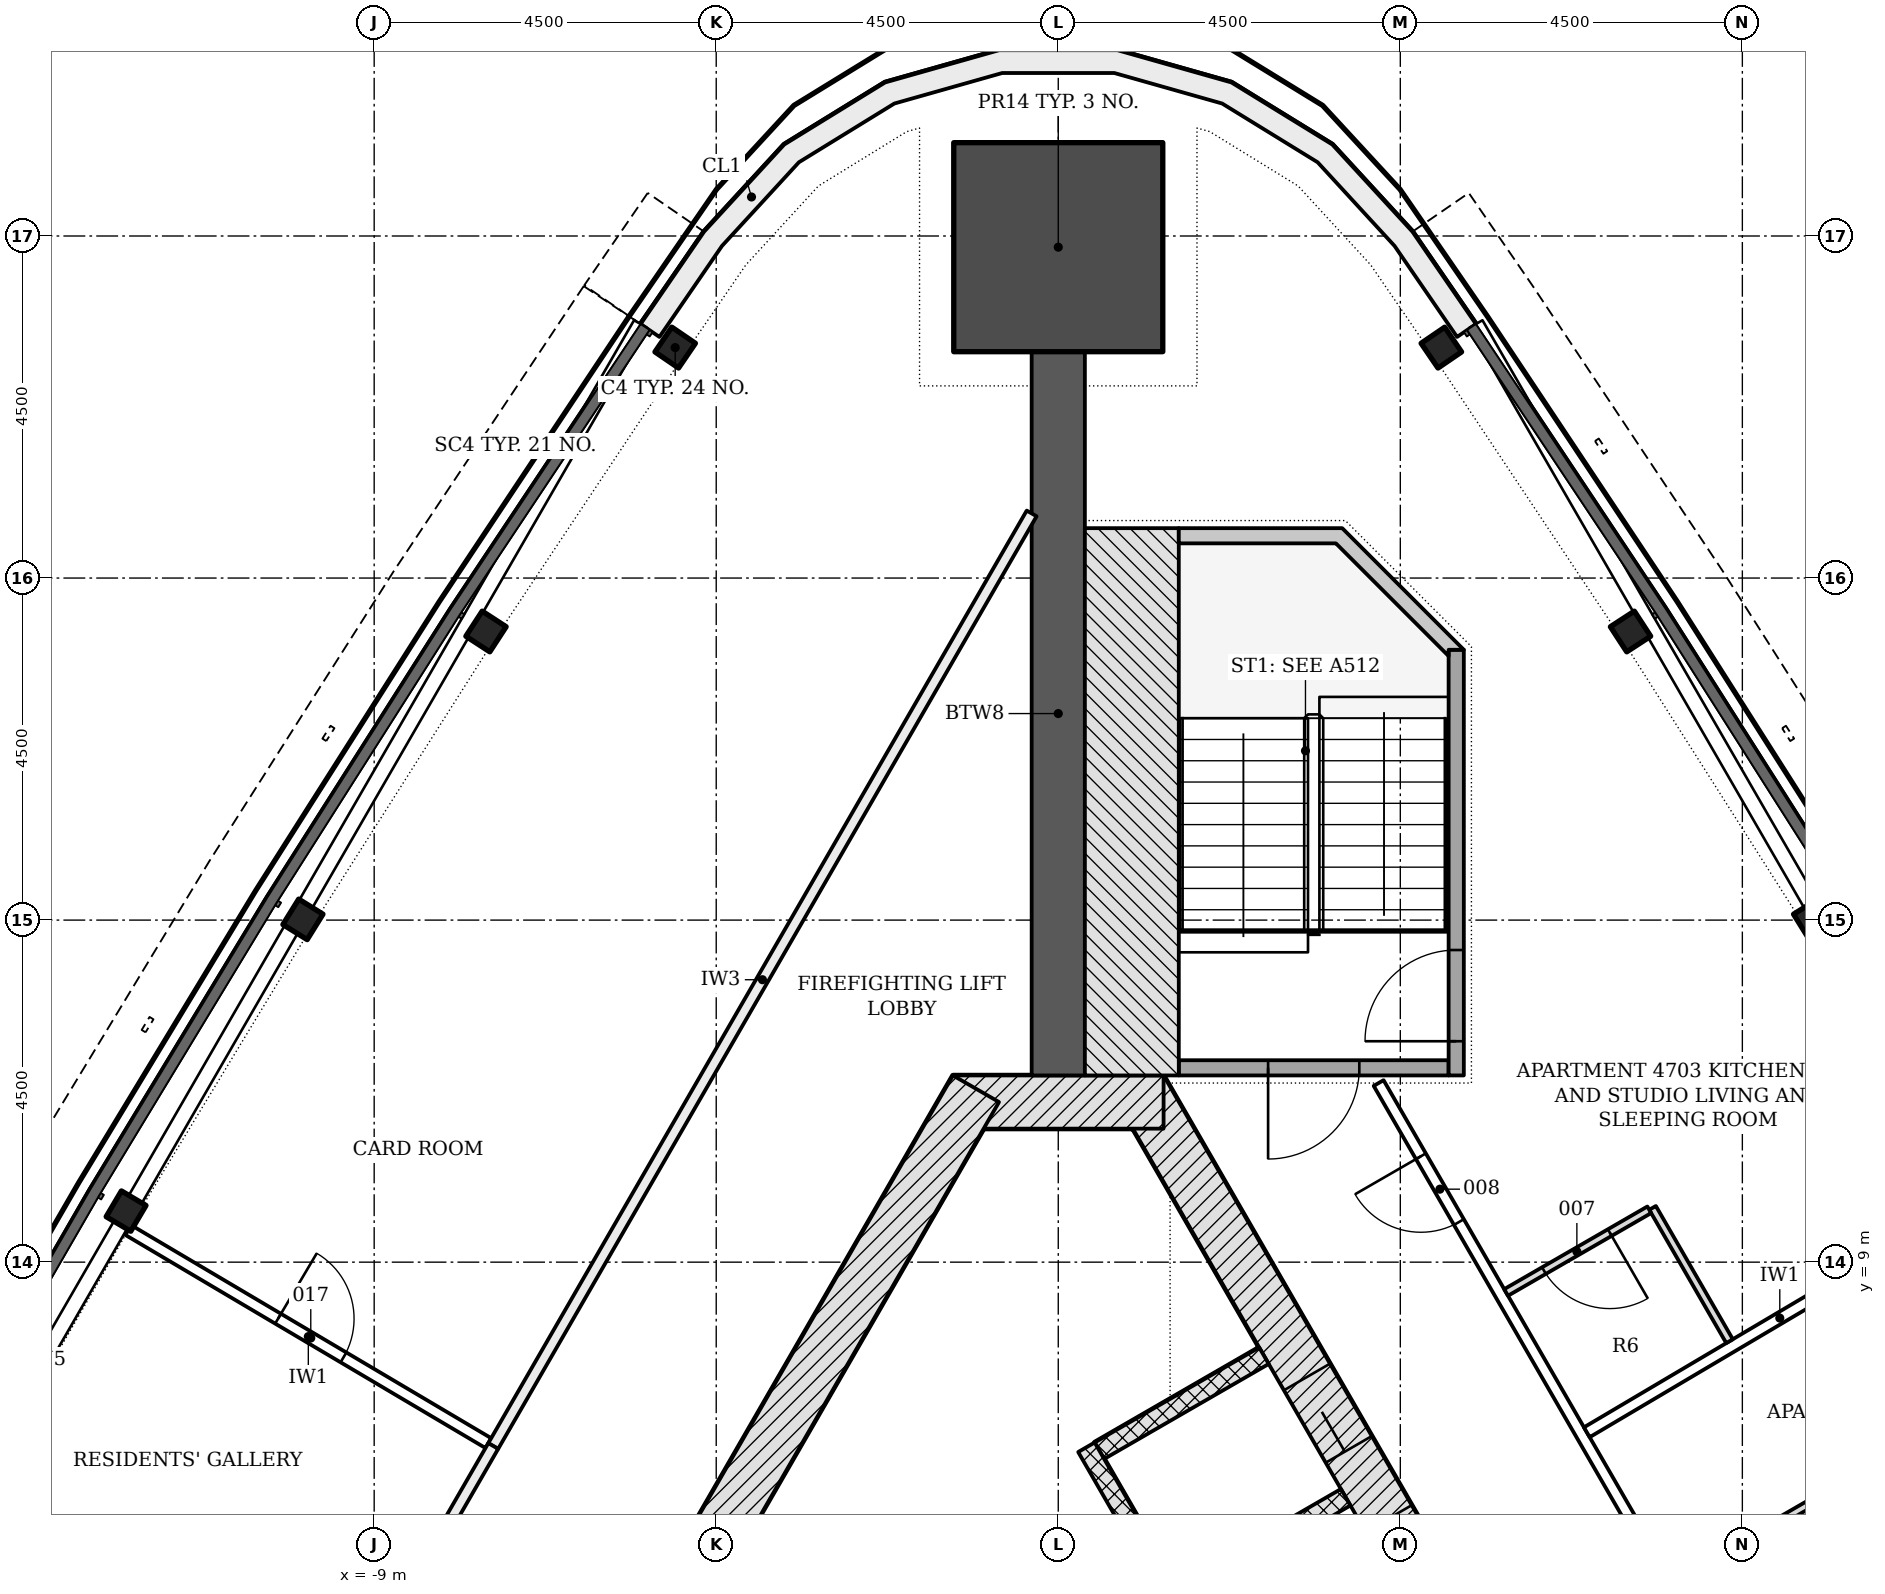
"""IFC4 building model, lengths in metres.
Left out: names, types, materials, properties, quantities, classifications, styles, units other than length and angle.
Written with IfcOpenShell. Run it as: python <this file> out.ifc"""

import sys

from ifc_helpers import new_model, si_unit, direction, frame, frame_2d, origin, origin_2d, place, context, subcontext, project, spatial, polyline, rectangle, i_section, outline, extrude, element, fill, save


model = new_model("IFC4")
c1 = context("Model", 3, precision=1e-05, world=origin(), true_north=direction((0.0, 1.0)))
c2 = subcontext(c1, "Body", "Model", "MODEL_VIEW")
j1 = project(units=[si_unit("LENGTHUNIT", "METRE"), si_unit("PLANEANGLEUNIT", "RADIAN")], contexts=[c1])
p1 = place(None, origin())
s1 = spatial("IfcSite", under=j1, at=p1, CompositionType="ELEMENT")
p2 = place(p1, origin())
s2 = spatial("IfcBuilding", under=s1, at=p2, CompositionType="ELEMENT")
p3 = place(p2, frame((0.0, 0.0, 185.1)))
s3 = spatial("IfcBuildingStorey", under=s2, at=p3, CompositionType="ELEMENT", Elevation=185.1)
p4 = place(p3, frame((10.311, -4.703, -0.2), z_axis=(0.0, 0.0, 1.0), x_axis=(-0.500001446645, 0.866024568562, 0.0)))
e1 = element("IfcWall", 1, at=p4, inside=s3, PredefinedType="SHEAR", context=c2, shape_type="SweptSolid", body=[
    extrude(rectangle(XDim=18.458, YDim=0.7, at=frame_2d((9.229, 0.0))), origin(), (0.0, 0.0, 1.0), 3.6),
])
p5 = place(p4, frame((4.379, 0.0, 0.2)))
e2 = element("IfcOpeningElement", 2, at=p5, cuts=e1, PredefinedType="OPENING", context=c2, shape_type="SweptSolid", body=[
    extrude(rectangle(XDim=1.1, YDim=2.1, at=frame_2d((0.55, 1.05))), frame((0.0, 0.36, 0.0), z_axis=(0.0, -1.0, 0.0), x_axis=(1.0, 0.0, 0.0)), (0.0, 0.0, 1.0), 0.72),
])
p6 = place(p4, frame((6.529, 0.0, 0.2)))
e3 = element("IfcOpeningElement", 3, at=p6, cuts=e1, PredefinedType="OPENING", context=c2, shape_type="SweptSolid", body=[
    extrude(rectangle(XDim=1.1, YDim=2.1, at=frame_2d((0.55, 1.05))), frame((0.0, 0.36, 0.0), z_axis=(0.0, -1.0, 0.0), x_axis=(1.0, 0.0, 0.0)), (0.0, 0.0, 1.0), 0.72),
])
p7 = place(p4, frame((8.679, 0.0, 0.2)))
e4 = element("IfcOpeningElement", 4, at=p7, cuts=e1, PredefinedType="OPENING", context=c2, shape_type="SweptSolid", body=[
    extrude(rectangle(XDim=1.1, YDim=2.1, at=frame_2d((0.55, 1.05))), frame((0.0, 0.36, 0.0), z_axis=(0.0, -1.0, 0.0), x_axis=(1.0, 0.0, 0.0)), (0.0, 0.0, 1.0), 0.72),
])
p8 = place(p4, frame((10.829, 0.0, 0.2)))
e5 = element("IfcOpeningElement", 5, at=p8, cuts=e1, PredefinedType="OPENING", context=c2, shape_type="SweptSolid", body=[
    extrude(rectangle(XDim=1.1, YDim=2.1, at=frame_2d((0.55, 1.05))), frame((0.0, 0.36, 0.0), z_axis=(0.0, -1.0, 0.0), x_axis=(1.0, 0.0, 0.0)), (0.0, 0.0, 1.0), 0.72),
])
p9 = place(p4, frame((12.979, 0.0, 0.2)))
e6 = element("IfcOpeningElement", 6, at=p9, cuts=e1, PredefinedType="OPENING", context=c2, shape_type="SweptSolid", body=[
    extrude(rectangle(XDim=1.1, YDim=2.1, at=frame_2d((0.55, 1.05))), frame((0.0, 0.36, 0.0), z_axis=(0.0, -1.0, 0.0), x_axis=(1.0, 0.0, 0.0)), (0.0, 0.0, 1.0), 0.72),
])
p10 = place(p3, frame((1.386, 11.106, -0.2), z_axis=(0.0, 0.0, 1.0), x_axis=(-1.0, 0.0, 0.0)))
e7 = element("IfcWall", 7, at=p10, inside=s3, PredefinedType="SHEAR", context=c2, shape_type="SweptSolid", body=[
    extrude(rectangle(XDim=2.771, YDim=0.7, at=frame_2d((1.386, 0.0))), origin(), (0.0, 0.0, 1.0), 3.6),
])
p11 = place(p3, frame((-1.083, 11.281, -0.2), z_axis=(0.0, 0.0, 1.0), x_axis=(-0.500001446645, -0.866024568562, 0.0)))
e8 = element("IfcWall", 8, at=p11, inside=s3, PredefinedType="SHEAR", context=c2, shape_type="SweptSolid", body=[
    extrude(rectangle(XDim=18.458, YDim=0.7, at=frame_2d((9.229, 0.0))), origin(), (0.0, 0.0, 1.0), 3.6),
])
p12 = place(p11, frame((8.979, 0.0, 0.2)))
e9 = element("IfcOpeningElement", 9, at=p12, cuts=e8, PredefinedType="OPENING", context=c2, shape_type="SweptSolid", body=[
    extrude(rectangle(XDim=1.2, YDim=2.1, at=frame_2d((0.6, 1.05))), frame((0.0, 0.36, 0.0), z_axis=(0.0, -1.0, 0.0), x_axis=(1.0, 0.0, 0.0)), (0.0, 0.0, 1.0), 0.72),
])
p13 = place(p11, frame((11.029, 0.0, 0.2)))
e10 = element("IfcOpeningElement", 10, at=p13, cuts=e8, PredefinedType="OPENING", context=c2, shape_type="SweptSolid", body=[
    extrude(rectangle(XDim=1.2, YDim=2.1, at=frame_2d((0.6, 1.05))), frame((0.0, 0.36, 0.0), z_axis=(0.0, -1.0, 0.0), x_axis=(1.0, 0.0, 0.0)), (0.0, 0.0, 1.0), 0.72),
])
p14 = place(p3, frame((0.0, 11.456, -0.2), z_axis=(0.0, 0.0, 1.0), x_axis=(0.0, 1.0, 0.0)))
e11 = element("IfcWall", 11, at=p14, inside=s3, PredefinedType="SHEAR", context=c2, shape_type="SweptSolid", body=[
    extrude(rectangle(XDim=9.522, YDim=0.7, at=frame_2d((4.761, 0.0))), origin(), (0.0, 0.0, 1.0), 3.6),
])
p15 = place(p3, frame((0.0, 22.353, -0.2), z_axis=(0.0, 0.0, 1.0), x_axis=(0.0, 1.0, 0.0)))
e12 = element("IfcColumn", 12, at=p15, inside=s3, PredefinedType="COLUMN", context=c2, shape_type="SweptSolid", body=[
    extrude(rectangle(XDim=2.75, YDim=2.75, at=origin_2d()), origin(), (0.0, 0.0, 1.0), 3.6),
])
for number, where, z_axis, x_axis in (
    (13, (-5.04, 21.032, -0.2), (0.0, 0.0, 1.0), (-0.563, -0.826, 0.0)),
    (14, (-7.529, 17.297, -0.2), (0.0, 0.0, 1.0), (-0.546, -0.838, 0.0)),
    (15, (-9.937, 13.51, -0.2), (0.0, 0.0, 1.0), (-0.528, -0.85, 0.0)),
    (16, (-12.264, 9.672, -0.2), (0.0, 0.0, 1.0), (-0.509, -0.861, 0.0)),
    (17, (9.937, 13.51, -0.2), (0.0, 0.0, 1.0), (-0.528, 0.85, 0.0)),
    (18, (7.529, 17.297, -0.2), (0.0, 0.0, 1.0), (-0.546, 0.838, 0.0)),
    (19, (5.04, 21.032, -0.2), (0.0, 0.0, 1.0), (-0.563, 0.826, 0.0)),
):
    element("IfcColumn", number, at=place(p3, frame(where, z_axis=z_axis, x_axis=x_axis)), inside=s3, PredefinedType="COLUMN", context=c2, shape_type="SweptSolid", body=[
        extrude(i_section(OverallWidth=0.394, OverallDepth=0.376, WebThickness=0.017, FlangeThickness=0.028, FilletRadius=0.015, at=origin_2d()), origin(), (0.0, 0.0, 1.0), 3.6),
    ])
p16 = place(p3, origin())
e20 = element("IfcWall", 20, at=p16, inside=s3, PredefinedType="NOTDEFINED", context=c2, shape_type="SweptSolid", body=[
    extrude(outline(polyline([(5.494, 21.342), (4.659, 22.557), (3.605, 23.704), (2.278, 24.52), (0.779, 24.944), (-0.779, 24.944), (-2.278, 24.52), (-3.605, 23.704), (-4.659, 22.557), (-5.494, 21.342), (-5.247, 21.172), (-4.424, 22.369), (-3.412, 23.47), (-2.156, 24.243), (-0.737, 24.644), (0.737, 24.644), (2.156, 24.243), (3.412, 23.47), (4.424, 22.369), (5.247, 21.172), (5.494, 21.342)])), origin(), (0.0, 0.0, 1.0), 3.3),
])
for number, where, z_axis, x_axis in (
    (21, (3.781, 5.907, -0.2), (0.0, 0.0, 1.0), (-0.866, -0.5, 0.0)),
    (22, (2.706, 7.769, -0.2), (0.0, 0.0, 1.0), (-0.866, -0.5, 0.0)),
):
    element("IfcWall", number, at=place(p3, frame(where, z_axis=z_axis, x_axis=x_axis)), inside=s3, PredefinedType="PARTITIONING", context=c2, shape_type="SweptSolid", body=[
        extrude(rectangle(XDim=2.5, YDim=0.25, at=frame_2d((1.25, 0.0))), origin(), (0.0, 0.0, 1.0), 3.6),
    ])
p17 = place(p3, frame((5.87, -2.961, 0.0), z_axis=(0.0, 0.0, 1.0), x_axis=(-0.50000615651, 0.866021849293, 0.0)))
e23 = element("IfcWall", 23, at=p17, inside=s3, PredefinedType="PARTITIONING", context=c2, shape_type="SweptSolid", body=[
    extrude(rectangle(XDim=11.0, YDim=0.25, at=frame_2d((5.5, 0.0))), origin(), (0.0, 0.0, 1.0), 3.4),
])
p18 = place(p3, frame((5.135, 11.556, -0.2), z_axis=(0.0, 0.0, 1.0), x_axis=(-1.0, 0.0, 0.0)))
e24 = element("IfcWall", 24, at=p18, inside=s3, PredefinedType="SHEAR", context=c2, shape_type="SweptSolid", body=[
    extrude(rectangle(XDim=3.55, YDim=0.2, at=frame_2d((1.775, 0.0))), origin(), (0.0, 0.0, 1.0), 3.6),
])
p19 = place(p18, frame((1.175, 0.0, 0.2)))
e25 = element("IfcOpeningElement", 25, at=p19, cuts=e24, PredefinedType="OPENING", context=c2, shape_type="SweptSolid", body=[
    extrude(rectangle(XDim=1.2, YDim=2.1, at=frame_2d((0.6, 1.05))), frame((0.0, 0.11, 0.0), z_axis=(0.0, -1.0, 0.0), x_axis=(1.0, 0.0, 0.0)), (0.0, 0.0, 1.0), 0.22),
])
p20 = place(p3, frame((5.236, 11.456, -0.2), z_axis=(0.0, 0.0, 1.0), x_axis=(0.0, 1.0, 0.0)))
e26 = element("IfcWall", 26, at=p20, inside=s3, PredefinedType="SHEAR", context=c2, shape_type="SweptSolid", body=[
    extrude(rectangle(XDim=5.6, YDim=0.2, at=frame_2d((2.8, 0.0))), origin(), (0.0, 0.0, 1.0), 3.6),
])
p21 = place(p20, frame((0.45, 0.0, 0.2)))
e27 = element("IfcOpeningElement", 27, at=p21, cuts=e26, PredefinedType="OPENING", context=c2, shape_type="SweptSolid", body=[
    extrude(rectangle(XDim=1.2, YDim=2.1, at=frame_2d((0.6, 1.05))), frame((0.0, 0.11, 0.0), z_axis=(0.0, -1.0, 0.0), x_axis=(1.0, 0.0, 0.0)), (0.0, 0.0, 1.0), 0.22),
])
p22 = place(p3, frame((0.968, 11.456, -0.2), z_axis=(0.0, 0.0, 1.0), x_axis=(0.0, 1.0, 0.0)))
e28 = element("IfcWall", 28, at=p22, inside=s3, PredefinedType="SHEAR", context=c2, shape_type="SweptSolid", body=[
    extrude(rectangle(XDim=7.2, YDim=1.236, at=frame_2d((3.6, 0.0))), origin(), (0.0, 0.0, 1.0), 3.6),
])
p23 = place(p3, frame((0.0, 0.0, -0.2)))
e29 = element("IfcWall", 29, at=p23, inside=s3, PredefinedType="SHEAR", context=c2, shape_type="SweptSolid", body=[
    extrude(outline(polyline([(5.336, 17.056), (3.736, 18.656), (1.586, 18.656), (1.586, 18.456), (3.653, 18.456), (5.135, 16.974), (5.135, 17.056), (5.135, 17.056), (5.135, 17.056), (5.135, 17.056), (5.135, 17.056), (5.135, 17.056), (5.135, 17.056), (5.135, 17.056), (5.135, 17.056), (5.135, 17.056), (5.135, 17.056), (5.135, 17.056), (5.135, 17.056), (5.135, 17.056), (5.135, 17.056), (5.135, 17.056), (5.135, 17.056), (5.336, 17.056)])), origin(), (0.0, 0.0, 1.0), 3.6),
])
p24 = place(p3, frame((11.247, -0.824, 0.0), z_axis=(0.0, 0.0, 1.0), x_axis=(-0.499997921847, 0.866026603603, 0.0)))
e30 = element("IfcWall", 30, at=p24, inside=s3, PredefinedType="PARTITIONING", context=c2, shape_type="SweptSolid", body=[
    extrude(rectangle(XDim=14.065, YDim=0.15, at=frame_2d((7.032, 0.0))), origin(), (0.0, 0.0, 1.0), 2.847),
])
p25 = place(p24, frame((11.953, 0.0, 0.0)))
e31 = element("IfcOpeningElement", 31, at=p25, cuts=e30, PredefinedType="OPENING", context=c2, shape_type="SweptSolid", body=[
    extrude(rectangle(XDim=1.0, YDim=2.1, at=frame_2d((0.5, 1.05))), frame((0.0, 0.085, 0.0), z_axis=(0.0, -1.0, 0.0), x_axis=(1.0, 0.0, 0.0)), (0.0, 0.0, 1.0), 0.17),
])
p26 = place(p3, frame((14.277, 5.885, 0.0), z_axis=(0.0, 0.0, 1.0), x_axis=(-0.871335785584, -0.490687220907, 0.0)))
e32 = element("IfcWall", 32, at=p26, inside=s3, PredefinedType="PARTITIONING", context=c2, shape_type="SweptSolid", body=[
    extrude(rectangle(XDim=5.904, YDim=0.1, at=frame_2d((2.952, 0.0))), origin(), (0.0, 0.0, 1.0), 3.4),
])
p27 = place(p26, frame((1.339, 0.0, 0.0)))
e33 = element("IfcOpeningElement", 33, at=p27, cuts=e32, PredefinedType="OPENING", context=c2, shape_type="SweptSolid", body=[
    extrude(rectangle(XDim=1.0, YDim=2.1, at=frame_2d((0.5, 1.05))), frame((0.0, 0.06, 0.0), z_axis=(0.0, -1.0, 0.0), x_axis=(1.0, 0.0, 0.0)), (0.0, 0.0, 1.0), 0.12),
])
p28 = place(p26, frame((4.329, 0.0, 0.0)))
e34 = element("IfcOpeningElement", 34, at=p28, cuts=e32, PredefinedType="OPENING", context=c2, shape_type="SweptSolid", body=[
    extrude(rectangle(XDim=1.0, YDim=2.1, at=frame_2d((0.5, 1.05))), frame((0.0, 0.06, 0.0), z_axis=(0.0, -1.0, 0.0), x_axis=(1.0, 0.0, 0.0)), (0.0, 0.0, 1.0), 0.12),
])
p29 = place(p3, frame((9.979, 5.873, 0.0), z_axis=(0.0, 0.0, 1.0), x_axis=(-0.866037911478, -0.499978335414, 0.0)))
e35 = element("IfcWall", 35, at=p29, inside=s3, PredefinedType="PARTITIONING", context=c2, shape_type="SweptSolid", body=[
    extrude(rectangle(XDim=2.175, YDim=0.1, at=frame_2d((1.087, 0.0))), origin(), (0.0, 0.0, 1.0), 3.4),
])
p30 = place(p3, frame((12.031, 9.766, 0.0), z_axis=(0.0, 0.0, 1.0), x_axis=(-0.860638865546, -0.509215811922, 0.0)))
e36 = element("IfcWall", 36, at=p30, inside=s3, PredefinedType="PARTITIONING", context=c2, shape_type="SweptSolid", body=[
    extrude(rectangle(XDim=5.9, YDim=0.15, at=frame_2d((2.95, 0.0))), origin(), (0.0, 0.0, 1.0), 3.4),
])
p31 = place(p3, frame((8.831, 7.96, 0.0), z_axis=(0.0, 0.0, 1.0), x_axis=(-0.499990325971, 0.866030989016, 0.0)))
e37 = element("IfcWall", 37, at=p31, inside=s3, PredefinedType="PARTITIONING", context=c2, shape_type="SweptSolid", body=[
    extrude(rectangle(XDim=2.025, YDim=0.1, at=frame_2d((1.012, 0.0))), origin(), (0.0, 0.0, 1.0), 3.4),
])
p32 = place(p3, frame((7.775, 9.689, 0.0), z_axis=(0.0, 0.0, 1.0), x_axis=(-0.865989304205, -0.500062521093, 0.0)))
e38 = element("IfcWall", 38, at=p32, inside=s3, PredefinedType="PARTITIONING", context=c2, shape_type="SweptSolid", body=[
    extrude(rectangle(XDim=2.175, YDim=0.1, at=frame_2d((1.087, 0.0))), origin(), (0.0, 0.0, 1.0), 3.4),
])
p33 = place(p32, frame((0.6, 0.0, 0.0)))
e39 = element("IfcOpeningElement", 39, at=p33, cuts=e38, PredefinedType="OPENING", context=c2, shape_type="SweptSolid", body=[
    extrude(rectangle(XDim=1.0, YDim=2.1, at=frame_2d((0.5, 1.05))), frame((0.0, 0.06, 0.0), z_axis=(0.0, -1.0, 0.0), x_axis=(1.0, 0.0, 0.0)), (0.0, 0.0, 1.0), 0.12),
])
p34 = place(p3, frame((-0.35, 18.85, 0.0), z_axis=(0.0, 0.0, 1.0), x_axis=(-0.500005388685, -0.866022292603, 0.0)))
e40 = element("IfcWall", 40, at=p34, inside=s3, PredefinedType="PARTITIONING", context=c2, shape_type="SweptSolid", body=[
    extrude(rectangle(XDim=14.167, YDim=0.15, at=frame_2d((7.083, 0.0))), origin(), (0.0, 0.0, 1.0), 2.847),
])
p35 = place(p3, frame((-12.235, 9.422, 0.0), z_axis=(0.0, 0.0, 1.0), x_axis=(0.860631434237, -0.509228371562, 0.0)))
e41 = element("IfcWall", 41, at=p35, inside=s3, PredefinedType="PARTITIONING", context=c2, shape_type="SweptSolid", body=[
    extrude(rectangle(XDim=5.504, YDim=0.15, at=frame_2d((2.752, 0.0))), origin(), (0.0, 0.0, 1.0), 3.4),
])
p36 = place(p35, frame((2.29, 0.0, 0.0)))
e42 = element("IfcOpeningElement", 42, at=p36, cuts=e41, PredefinedType="OPENING", context=c2, shape_type="SweptSolid", body=[
    extrude(rectangle(XDim=1.0, YDim=2.1, at=frame_2d((0.5, 1.05))), frame((0.0, 0.085, 0.0), z_axis=(0.0, -1.0, 0.0), x_axis=(1.0, 0.0, 0.0)), (0.0, 0.0, 1.0), 0.17),
])
p37 = place(p3, frame((-7.434, 6.581, 0.0), z_axis=(0.0, 0.0, 1.0), x_axis=(-0.499964504253, -0.866045896294, 0.0)))
e43 = element("IfcWall", 43, at=p37, inside=s3, PredefinedType="PARTITIONING", context=c2, shape_type="SweptSolid", body=[
    extrude(rectangle(XDim=4.365, YDim=0.15, at=frame_2d((2.183, 0.0))), origin(), (0.0, 0.0, 1.0), 2.847),
])
p38 = place(p37, frame((1.683, 0.0, 0.0)))
e44 = element("IfcOpeningElement", 44, at=p38, cuts=e43, PredefinedType="OPENING", context=c2, shape_type="SweptSolid", body=[
    extrude(rectangle(XDim=1.0, YDim=2.1, at=frame_2d((0.5, 1.05))), frame((0.0, 0.085, 0.0), z_axis=(0.0, -1.0, 0.0), x_axis=(1.0, 0.0, 0.0)), (0.0, 0.0, 1.0), 0.17),
])
p39 = place(p9, origin())
e45 = element("IfcDoor", 45, at=p39, inside=s3, OperationType="DOUBLE_DOOR_SLIDING", PredefinedType="DOOR", context=c2, shape_type="SweptSolid", body=[
    extrude(rectangle(XDim=1.1, YDim=2.1, at=frame_2d((0.55, 1.05))), frame((0.0, 0.025, 0.0), z_axis=(0.0, -1.0, 0.0), x_axis=(1.0, 0.0, 0.0)), (0.0, 0.0, 1.0), 0.05),
])
fill(e6, e45)
p40 = place(p19, origin())
e46 = element("IfcDoor", 46, at=p40, inside=s3, OperationType="SINGLE_SWING_RIGHT", PredefinedType="DOOR", context=c2, shape_type="SweptSolid", body=[
    extrude(rectangle(XDim=1.2, YDim=2.1, at=frame_2d((0.6, 1.05))), frame((0.0, 0.025, 0.0), z_axis=(0.0, -1.0, 0.0), x_axis=(1.0, 0.0, 0.0)), (0.0, 0.0, 1.0), 0.05),
])
fill(e25, e46)
p41 = place(p21, origin())
e47 = element("IfcDoor", 47, at=p41, inside=s3, OperationType="SINGLE_SWING_LEFT", PredefinedType="DOOR", context=c2, shape_type="SweptSolid", body=[
    extrude(rectangle(XDim=1.2, YDim=2.1, at=frame_2d((0.6, 1.05))), frame((0.0, 0.025, 0.0), z_axis=(0.0, -1.0, 0.0), x_axis=(1.0, 0.0, 0.0)), (0.0, 0.0, 1.0), 0.05),
])
fill(e27, e47)
p42 = place(p33, origin())
e48 = element("IfcDoor", 48, at=p42, inside=s3, OperationType="SINGLE_SWING_LEFT", PredefinedType="DOOR", context=c2, shape_type="SweptSolid", body=[
    extrude(rectangle(XDim=1.0, YDim=2.1, at=frame_2d((0.5, 1.05))), frame((0.0, 0.025, 0.0), z_axis=(0.0, -1.0, 0.0), x_axis=(1.0, 0.0, 0.0)), (0.0, 0.0, 1.0), 0.05),
])
fill(e39, e48)
p43 = place(p25, origin())
e49 = element("IfcDoor", 49, at=p43, inside=s3, OperationType="SINGLE_SWING_RIGHT", PredefinedType="DOOR", context=c2, shape_type="SweptSolid", body=[
    extrude(rectangle(XDim=1.0, YDim=2.1, at=frame_2d((0.5, 1.05))), frame((0.0, 0.025, 0.0), z_axis=(0.0, -1.0, 0.0), x_axis=(1.0, 0.0, 0.0)), (0.0, 0.0, 1.0), 0.05),
])
fill(e31, e49)
p44 = place(p36, origin())
e50 = element("IfcDoor", 50, at=p44, inside=s3, OperationType="SINGLE_SWING_LEFT", PredefinedType="DOOR", context=c2, shape_type="SweptSolid", body=[
    extrude(rectangle(XDim=1.0, YDim=2.1, at=frame_2d((0.5, 1.05))), frame((0.0, 0.025, 0.0), z_axis=(0.0, -1.0, 0.0), x_axis=(1.0, 0.0, 0.0)), (0.0, 0.0, 1.0), 0.05),
])
fill(e42, e50)
save(model, sys.argv[1])
